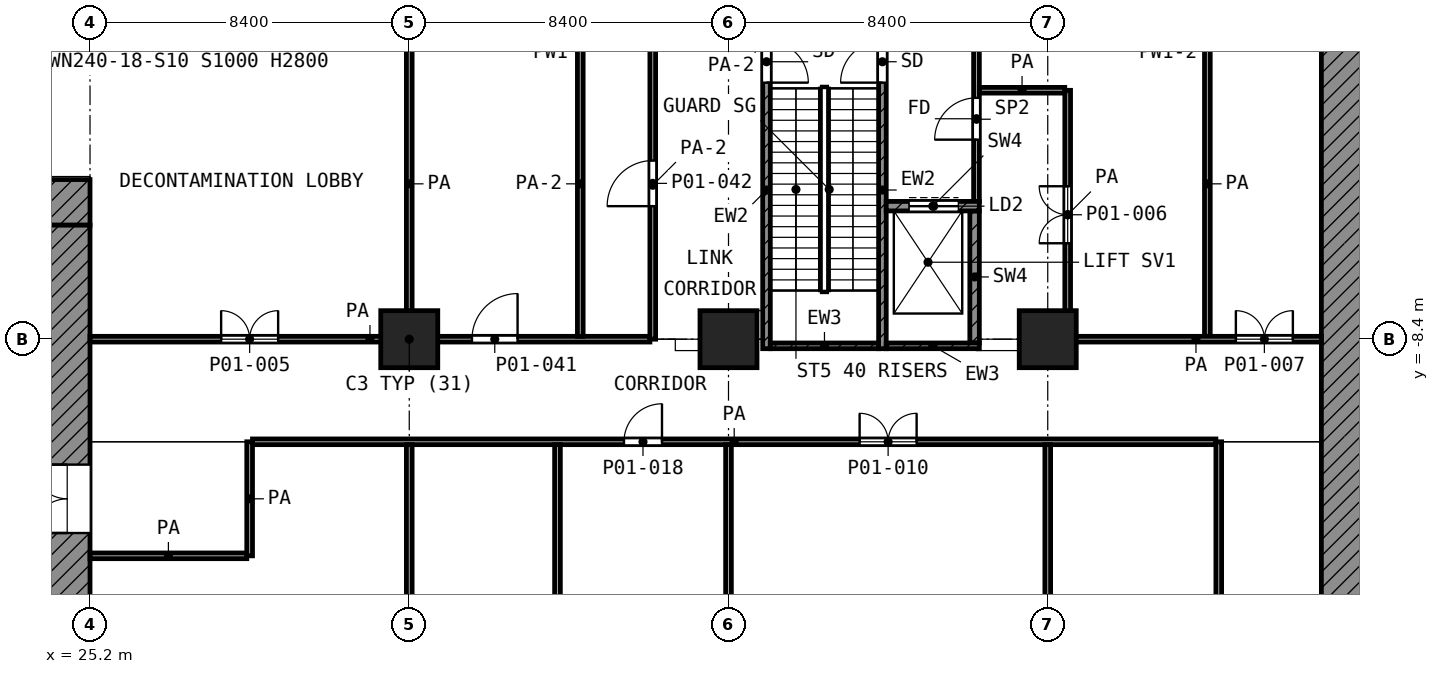
"""IFC4 building model, lengths in metres.
Left out: names, types, materials, properties, quantities, classifications, styles, units other than length and angle.
Written with IfcOpenShell. Run it as: python <this file> out.ifc"""

import sys

from ifc_helpers import new_model, si_unit, direction, frame, frame_2d, origin, origin_2d, place, context, subcontext, project, spatial, polyline, rectangle, outline, extrude, element, fill, save


model = new_model("IFC4")
c1 = context("Model", 3, precision=1e-05, world=origin(), true_north=direction((0.0, 1.0)))
c2 = subcontext(c1, "Body", "Model", "MODEL_VIEW")
j1 = project(units=[si_unit("LENGTHUNIT", "METRE"), si_unit("PLANEANGLEUNIT", "RADIAN")], contexts=[c1])
p1 = place(None, origin())
s1 = spatial("IfcSite", under=j1, at=p1, CompositionType="ELEMENT")
p2 = place(p1, origin())
s2 = spatial("IfcBuilding", under=s1, at=p2, CompositionType="ELEMENT")
p3 = place(p2, origin())
s3 = spatial("IfcBuildingStorey", under=s2, at=p3, CompositionType="ELEMENT", Elevation=0.0)
for number, where, z_axis, x_axis in (
    (1, (33.6, -8.4, 0.0), (0.0, 0.0, 1.0), (1.0, 0.0, 0.0)),
    (2, (42.0, -8.4, 0.0), (0.0, 0.0, 1.0), (1.0, 0.0, 0.0)),
    (3, (50.4, -8.4, 0.0), (0.0, 0.0, 1.0), (1.0, 0.0, 0.0)),
):
    element("IfcColumn", number, at=place(p3, frame(where, z_axis=z_axis, x_axis=x_axis)), inside=s3, PredefinedType="COLUMN", context=c2, shape_type="SweptSolid", body=[
        extrude(rectangle(XDim=1.5, YDim=1.5, at=origin_2d()), origin(), (0.0, 0.0, 1.0), 7.0),
    ])
p4 = place(p3, frame((0.0, 0.0, 0.0), z_axis=(0.0, -1.0, 0.0), x_axis=(1.0, 0.0, 0.0)))
e4 = element("IfcWall", 4, at=p4, inside=s3, PredefinedType="SHEAR", context=c2, shape_type="SweptSolid", body=[
    extrude(outline(polyline([(60.0, 7.0), (60.0, 6.75), (60.0, 4.5), (60.0, 2.25), (60.0, 0.0), (57.6, 0.0), (57.6, 7.0), (60.0, 7.0)])), origin(), (0.0, 0.0, 1.0), 33.6),
])
p5 = place(p3, frame((4.2, -4.8, 0.0), z_axis=(0.0, 0.0, 1.0), x_axis=(1.0, 0.0, 0.0)))
e5 = element("IfcWall", 5, at=p5, inside=s3, PredefinedType="SHEAR", context=c2, shape_type="SweptSolid", body=[
    extrude(rectangle(XDim=21.0, YDim=1.2, at=frame_2d((10.5, 0.0))), origin(), (0.0, 0.0, 1.0), 6.65),
])
p6 = place(p5, frame((1.95, 0.0, 0.0)))
e6 = element("IfcOpeningElement", 6, at=p6, cuts=e5, PredefinedType="OPENING", context=c2, shape_type="SweptSolid", body=[
    extrude(rectangle(XDim=1.1, YDim=2.1, at=frame_2d((0.55, 1.05))), frame((0.0, 0.61, 0.0), z_axis=(0.0, -1.0, 0.0), x_axis=(1.0, 0.0, 0.0)), (0.0, 0.0, 1.0), 1.22),
])
p7 = place(p5, frame((17.95, 0.0, 0.0)))
e7 = element("IfcOpeningElement", 7, at=p7, cuts=e5, PredefinedType="OPENING", context=c2, shape_type="SweptSolid", body=[
    extrude(rectangle(XDim=1.1, YDim=2.1, at=frame_2d((0.55, 1.05))), frame((0.0, 0.61, 0.0), z_axis=(0.0, -1.0, 0.0), x_axis=(1.0, 0.0, 0.0)), (0.0, 0.0, 1.0), 1.22),
])
p8 = place(p3, frame((24.6, -24.0, 0.0), z_axis=(0.0, 0.0, 1.0), x_axis=(0.0, 1.0, 0.0)))
e8 = element("IfcWall", 8, at=p8, inside=s3, PredefinedType="SHEAR", context=c2, shape_type="SweptSolid", body=[
    extrude(rectangle(XDim=18.6, YDim=1.2, at=frame_2d((9.3, 0.0))), origin(), (0.0, 0.0, 1.0), 6.65),
])
p9 = place(p8, frame((10.5, 0.0, 0.0)))
e9 = element("IfcOpeningElement", 9, at=p9, cuts=e8, PredefinedType="OPENING", context=c2, shape_type="SweptSolid", body=[
    extrude(rectangle(XDim=1.8, YDim=2.1, at=frame_2d((0.9, 1.05))), frame((0.0, 0.61, 0.0), z_axis=(0.0, -1.0, 0.0), x_axis=(1.0, 0.0, 0.0)), (0.0, 0.0, 1.0), 1.22),
])
p10 = place(p3, frame((43.0, -8.65, 0.0), z_axis=(0.0, 0.0, 1.0), x_axis=(0.0, 1.0, 0.0)))
e10 = element("IfcWall", 10, at=p10, inside=s3, PredefinedType="SHEAR", context=c2, shape_type="SweptSolid", body=[
    extrude(rectangle(XDim=8.35, YDim=0.2, at=frame_2d((4.175, 0.0))), origin(), (0.0, 0.0, 1.0), 6.65),
])
p11 = place(p10, frame((7.0, 0.0, 0.0)))
e11 = element("IfcOpeningElement", 11, at=p11, cuts=e10, PredefinedType="OPENING", context=c2, shape_type="SweptSolid", body=[
    extrude(rectangle(XDim=1.1, YDim=2.1, at=frame_2d((0.55, 1.05))), frame((0.0, 0.11, 0.0), z_axis=(0.0, -1.0, 0.0), x_axis=(1.0, 0.0, 0.0)), (0.0, 0.0, 1.0), 0.22),
])
p12 = place(p3, frame((46.05, -8.65, 0.0), z_axis=(0.0, 0.0, 1.0), x_axis=(0.0, 1.0, 0.0)))
e12 = element("IfcWall", 12, at=p12, inside=s3, PredefinedType="SHEAR", context=c2, shape_type="SweptSolid", body=[
    extrude(rectangle(XDim=8.35, YDim=0.2, at=frame_2d((4.175, 0.0))), origin(), (0.0, 0.0, 1.0), 6.65),
])
p13 = place(p12, frame((7.0, 0.0, 0.0)))
e13 = element("IfcOpeningElement", 13, at=p13, cuts=e12, PredefinedType="OPENING", context=c2, shape_type="SweptSolid", body=[
    extrude(rectangle(XDim=1.1, YDim=2.1, at=frame_2d((0.55, 1.05))), frame((0.0, 0.11, 0.0), z_axis=(0.0, -1.0, 0.0), x_axis=(1.0, 0.0, 0.0)), (0.0, 0.0, 1.0), 0.22),
])
p14 = place(p3, frame((43.1, -8.575, 0.0), z_axis=(0.0, 0.0, 1.0), x_axis=(1.0, 0.0, 0.0)))
e14 = element("IfcWall", 14, at=p14, inside=s3, PredefinedType="SHEAR", context=c2, shape_type="SweptSolid", body=[
    extrude(rectangle(XDim=2.85, YDim=0.15, at=frame_2d((1.425, 0.0))), origin(), (0.0, 0.0, 1.0), 6.65),
])
p15 = place(p3, frame((46.15, -8.575, 0.0), z_axis=(0.0, 0.0, 1.0), x_axis=(1.0, 0.0, 0.0)))
e15 = element("IfcWall", 15, at=p15, inside=s3, PredefinedType="SHEAR", context=c2, shape_type="SweptSolid", body=[
    extrude(rectangle(XDim=2.45, YDim=0.15, at=frame_2d((1.225, 0.0))), origin(), (0.0, 0.0, 1.0), 6.65),
])
p16 = place(p3, frame((46.15, -4.9, 0.0), z_axis=(0.0, 0.0, 1.0), x_axis=(1.0, 0.0, 0.0)))
e16 = element("IfcWall", 16, at=p16, inside=s3, PredefinedType="SHEAR", context=c2, shape_type="SweptSolid", body=[
    extrude(rectangle(XDim=2.45, YDim=0.25, at=frame_2d((1.225, 0.0))), origin(), (0.0, 0.0, 1.0), 6.65),
])
p17 = place(p16, frame((0.6, 0.0, 0.0)))
e17 = element("IfcOpeningElement", 17, at=p17, cuts=e16, PredefinedType="OPENING", context=c2, shape_type="SweptSolid", body=[
    extrude(rectangle(XDim=1.3, YDim=2.1, at=frame_2d((0.65, 1.05))), frame((0.0, 0.135, 0.0), z_axis=(0.0, -1.0, 0.0), x_axis=(1.0, 0.0, 0.0)), (0.0, 0.0, 1.0), 0.27),
])
p18 = place(p3, frame((48.475, -8.5, 0.0), z_axis=(0.0, 0.0, 1.0), x_axis=(0.0, 1.0, 0.0)))
e18 = element("IfcWall", 18, at=p18, inside=s3, PredefinedType="SHEAR", context=c2, shape_type="SweptSolid", body=[
    extrude(rectangle(XDim=3.475, YDim=0.25, at=frame_2d((1.738, 0.0))), origin(), (0.0, 0.0, 1.0), 6.65),
])
p19 = place(p3, frame((48.525, -4.775, 0.0), z_axis=(0.0, 0.0, 1.0), x_axis=(0.0, 1.0, 0.0)))
e19 = element("IfcWall", 19, at=p19, inside=s3, PredefinedType="PARTITIONING", context=c2, shape_type="SweptSolid", body=[
    extrude(rectangle(XDim=4.325, YDim=0.15, at=frame_2d((2.163, 0.0))), origin(), (0.0, 0.0, 1.0), 6.65),
])
p20 = place(p19, frame((1.625, 0.0, 0.0)))
e20 = element("IfcOpeningElement", 20, at=p20, cuts=e19, PredefinedType="OPENING", context=c2, shape_type="SweptSolid", body=[
    extrude(rectangle(XDim=1.1, YDim=2.1, at=frame_2d((0.55, 1.05))), frame((0.0, 0.085, 0.0), z_axis=(0.0, -1.0, 0.0), x_axis=(1.0, 0.0, 0.0)), (0.0, 0.0, 1.0), 0.17),
])
p21 = place(p3, frame((25.2, -14.1, 0.0), z_axis=(0.0, 0.0, 1.0), x_axis=(1.0, 0.0, 0.0)))
e21 = element("IfcWall", 21, at=p21, inside=s3, PredefinedType="PARTITIONING", context=c2, shape_type="SweptSolid", body=[
    extrude(rectangle(XDim=4.125, YDim=0.15, at=frame_2d((2.062, 0.0))), origin(), (0.0, 0.0, 1.0), 6.65),
])
p22 = place(p3, frame((29.475, -11.1, 0.0), z_axis=(0.0, 0.0, 1.0), x_axis=(1.0, 0.0, 0.0)))
e22 = element("IfcWall", 22, at=p22, inside=s3, PredefinedType="PARTITIONING", context=c2, shape_type="SweptSolid", body=[
    extrude(rectangle(XDim=25.35, YDim=0.15, at=frame_2d((12.675, 0.0))), origin(), (0.0, 0.0, 1.0), 6.65),
])
p23 = place(p22, frame((9.775, 0.0, 0.0)))
e23 = element("IfcOpeningElement", 23, at=p23, cuts=e22, PredefinedType="OPENING", context=c2, shape_type="SweptSolid", body=[
    extrude(rectangle(XDim=1.0, YDim=2.1, at=frame_2d((0.5, 1.05))), frame((0.0, 0.085, 0.0), z_axis=(0.0, -1.0, 0.0), x_axis=(1.0, 0.0, 0.0)), (0.0, 0.0, 1.0), 0.17),
])
p24 = place(p22, frame((15.975, 0.0, 0.0)))
e24 = element("IfcOpeningElement", 24, at=p24, cuts=e22, PredefinedType="OPENING", context=c2, shape_type="SweptSolid", body=[
    extrude(rectangle(XDim=1.5, YDim=2.1, at=frame_2d((0.75, 1.05))), frame((0.0, 0.085, 0.0), z_axis=(0.0, -1.0, 0.0), x_axis=(1.0, 0.0, 0.0)), (0.0, 0.0, 1.0), 0.17),
])
p25 = place(p3, frame((25.2, -8.4, 0.0), z_axis=(0.0, 0.0, 1.0), x_axis=(1.0, 0.0, 0.0)))
e25 = element("IfcWall", 25, at=p25, inside=s3, PredefinedType="PARTITIONING", context=c2, shape_type="SweptSolid", body=[
    extrude(rectangle(XDim=14.732, YDim=0.15, at=frame_2d((7.366, 0.0))), origin(), (0.0, 0.0, 1.0), 6.65),
])
p26 = place(p25, frame((3.45, 0.0, 0.0)))
e26 = element("IfcOpeningElement", 26, at=p26, cuts=e25, PredefinedType="OPENING", context=c2, shape_type="SweptSolid", body=[
    extrude(rectangle(XDim=1.5, YDim=2.1, at=frame_2d((0.75, 1.05))), frame((0.0, 0.085, 0.0), z_axis=(0.0, -1.0, 0.0), x_axis=(1.0, 0.0, 0.0)), (0.0, 0.0, 1.0), 0.17),
])
p27 = place(p25, frame((10.05, 0.0, 0.0)))
e27 = element("IfcOpeningElement", 27, at=p27, cuts=e25, PredefinedType="OPENING", context=c2, shape_type="SweptSolid", body=[
    extrude(rectangle(XDim=1.2, YDim=2.1, at=frame_2d((0.6, 1.05))), frame((0.0, 0.085, 0.0), z_axis=(0.0, -1.0, 0.0), x_axis=(1.0, 0.0, 0.0)), (0.0, 0.0, 1.0), 0.17),
])
p28 = place(p3, frame((51.0, -8.4, 0.0), z_axis=(0.0, 0.0, 1.0), x_axis=(1.0, 0.0, 0.0)))
e28 = element("IfcWall", 28, at=p28, inside=s3, PredefinedType="PARTITIONING", context=c2, shape_type="SweptSolid", body=[
    extrude(rectangle(XDim=6.6, YDim=0.15, at=frame_2d((3.3, 0.0))), origin(), (0.0, 0.0, 1.0), 6.65),
])
p29 = place(p28, frame((4.35, 0.0, 0.0)))
e29 = element("IfcOpeningElement", 29, at=p29, cuts=e28, PredefinedType="OPENING", context=c2, shape_type="SweptSolid", body=[
    extrude(rectangle(XDim=1.5, YDim=2.1, at=frame_2d((0.75, 1.05))), frame((0.0, 0.085, 0.0), z_axis=(0.0, -1.0, 0.0), x_axis=(1.0, 0.0, 0.0)), (0.0, 0.0, 1.0), 0.17),
])
p30 = place(p3, frame((48.6, -1.85, 0.0), z_axis=(0.0, 0.0, 1.0), x_axis=(1.0, 0.0, 0.0)))
e30 = element("IfcWall", 30, at=p30, inside=s3, PredefinedType="PARTITIONING", context=c2, shape_type="SweptSolid", body=[
    extrude(rectangle(XDim=2.248, YDim=0.15, at=frame_2d((1.124, 0.0))), origin(), (0.0, 0.0, 1.0), 6.65),
])
p31 = place(p3, frame((29.4, -14.1, 0.0), z_axis=(0.0, 0.0, 1.0), x_axis=(0.0, 1.0, 0.0)))
e31 = element("IfcWall", 31, at=p31, inside=s3, PredefinedType="PARTITIONING", context=c2, shape_type="SweptSolid", body=[
    extrude(rectangle(XDim=3.0, YDim=0.15, at=frame_2d((1.5, 0.0))), origin(), (0.0, 0.0, 1.0), 6.65),
])
p32 = place(p3, frame((33.6, -22.425, 0.0), z_axis=(0.0, 0.0, 1.0), x_axis=(0.0, 1.0, 0.0)))
e32 = element("IfcWall", 32, at=p32, inside=s3, PredefinedType="PARTITIONING", context=c2, shape_type="SweptSolid", body=[
    extrude(rectangle(XDim=11.25, YDim=0.15, at=frame_2d((5.625, 0.0))), origin(), (0.0, 0.0, 1.0), 6.65),
])
p33 = place(p3, frame((33.6, -8.325, 0.0), z_axis=(0.0, 0.0, 1.0), x_axis=(0.0, 1.0, 0.0)))
e33 = element("IfcWall", 33, at=p33, inside=s3, PredefinedType="PARTITIONING", context=c2, shape_type="SweptSolid", body=[
    extrude(rectangle(XDim=8.025, YDim=0.15, at=frame_2d((4.012, 0.0))), origin(), (0.0, 0.0, 1.0), 6.65),
])
p34 = place(p3, frame((37.5, -22.425, 0.0), z_axis=(0.0, 0.0, 1.0), x_axis=(0.0, 1.0, 0.0)))
e34 = element("IfcWall", 34, at=p34, inside=s3, PredefinedType="PARTITIONING", context=c2, shape_type="SweptSolid", body=[
    extrude(rectangle(XDim=11.25, YDim=0.15, at=frame_2d((5.625, 0.0))), origin(), (0.0, 0.0, 1.0), 6.65),
])
p35 = place(p3, frame((38.1, -8.325, 0.0), z_axis=(0.0, 0.0, 1.0), x_axis=(0.0, 1.0, 0.0)))
e35 = element("IfcWall", 35, at=p35, inside=s3, PredefinedType="PARTITIONING", context=c2, shape_type="SweptSolid", body=[
    extrude(rectangle(XDim=8.025, YDim=0.15, at=frame_2d((4.012, 0.0))), origin(), (0.0, 0.0, 1.0), 5.25),
])
p36 = place(p3, frame((40.007, -8.4, 0.0), z_axis=(0.0, 0.0, 1.0), x_axis=(0.0, 1.0, 0.0)))
e36 = element("IfcWall", 36, at=p36, inside=s3, PredefinedType="PARTITIONING", context=c2, shape_type="SweptSolid", body=[
    extrude(rectangle(XDim=8.1, YDim=0.15, at=frame_2d((4.05, 0.0))), origin(), (0.0, 0.0, 1.0), 5.25),
])
p37 = place(p36, frame((3.5, 0.0, 0.0)))
e37 = element("IfcOpeningElement", 37, at=p37, cuts=e36, PredefinedType="OPENING", context=c2, shape_type="SweptSolid", body=[
    extrude(rectangle(XDim=1.2, YDim=2.1, at=frame_2d((0.6, 1.05))), frame((0.0, 0.085, 0.0), z_axis=(0.0, -1.0, 0.0), x_axis=(1.0, 0.0, 0.0)), (0.0, 0.0, 1.0), 0.17),
])
for number, where, z_axis, x_axis in (
    (38, (42.0, -22.425, 0.0), (0.0, 0.0, 1.0), (0.0, 1.0, 0.0)),
    (39, (50.4, -22.425, 0.0), (0.0, 0.0, 1.0), (0.0, 1.0, 0.0)),
):
    element("IfcWall", number, at=place(p3, frame(where, z_axis=z_axis, x_axis=x_axis)), inside=s3, PredefinedType="PARTITIONING", context=c2, shape_type="SweptSolid", body=[
        extrude(rectangle(XDim=11.25, YDim=0.15, at=frame_2d((5.625, 0.0))), origin(), (0.0, 0.0, 1.0), 6.65),
    ])
p38 = place(p3, frame((50.925, -8.4, 0.0), z_axis=(0.0, 0.0, 1.0), x_axis=(0.0, 1.0, 0.0)))
e40 = element("IfcWall", 40, at=p38, inside=s3, PredefinedType="PARTITIONING", context=c2, shape_type="SweptSolid", body=[
    extrude(rectangle(XDim=6.548, YDim=0.15, at=frame_2d((3.274, 0.0))), origin(), (0.0, 0.0, 1.0), 6.65),
])
p39 = place(p38, frame((2.524, 0.0, 0.0)))
e41 = element("IfcOpeningElement", 41, at=p39, cuts=e40, PredefinedType="OPENING", context=c2, shape_type="SweptSolid", body=[
    extrude(rectangle(XDim=1.5, YDim=2.1, at=frame_2d((0.75, 1.05))), frame((0.0, 0.085, 0.0), z_axis=(0.0, -1.0, 0.0), x_axis=(1.0, 0.0, 0.0)), (0.0, 0.0, 1.0), 0.17),
])
p40 = place(p3, frame((54.6, -8.325, 0.0), z_axis=(0.0, 0.0, 1.0), x_axis=(0.0, 1.0, 0.0)))
e42 = element("IfcWall", 42, at=p40, inside=s3, PredefinedType="PARTITIONING", context=c2, shape_type="SweptSolid", body=[
    extrude(rectangle(XDim=8.025, YDim=0.15, at=frame_2d((4.012, 0.0))), origin(), (0.0, 0.0, 1.0), 6.65),
])
p41 = place(p3, frame((54.9, -22.5, 0.0), z_axis=(0.0, 0.0, 1.0), x_axis=(0.0, 1.0, 0.0)))
e43 = element("IfcWall", 43, at=p41, inside=s3, PredefinedType="PARTITIONING", context=c2, shape_type="SweptSolid", body=[
    extrude(rectangle(XDim=11.4, YDim=0.15, at=frame_2d((5.7, 0.0))), origin(), (0.0, 0.0, 1.0), 6.65),
])
p42 = place(p41, frame((4.95, 0.0, 0.0)))
e44 = element("IfcOpeningElement", 44, at=p42, cuts=e43, PredefinedType="OPENING", context=c2, shape_type="SweptSolid", body=[
    extrude(rectangle(XDim=1.5, YDim=2.1, at=frame_2d((0.75, 1.05))), frame((0.0, 0.085, 0.0), z_axis=(0.0, -1.0, 0.0), x_axis=(1.0, 0.0, 0.0)), (0.0, 0.0, 1.0), 0.17),
])
p43 = place(p9, origin())
e45 = element("IfcDoor", 45, at=p43, inside=s3, OperationType="DOUBLE_DOOR_SINGLE_SWING", PredefinedType="DOOR", context=c2, shape_type="SweptSolid", body=[
    extrude(rectangle(XDim=1.8, YDim=2.1, at=frame_2d((0.9, 1.05))), frame((0.0, 0.025, 0.0), z_axis=(0.0, -1.0, 0.0), x_axis=(1.0, 0.0, 0.0)), (0.0, 0.0, 1.0), 0.05),
])
fill(e9, e45)
p44 = place(p11, frame((1.1, 0.0, 0.0), z_axis=(0.0, 0.0, 1.0), x_axis=(-1.0, 0.0, 0.0)))
e46 = element("IfcDoor", 46, at=p44, inside=s3, OperationType="SINGLE_SWING_LEFT", PredefinedType="DOOR", context=c2, shape_type="SweptSolid", body=[
    extrude(rectangle(XDim=1.1, YDim=2.1, at=frame_2d((0.55, 1.05))), frame((0.0, 0.025, 0.0), z_axis=(0.0, -1.0, 0.0), x_axis=(1.0, 0.0, 0.0)), (0.0, 0.0, 1.0), 0.05),
])
fill(e11, e46)
p45 = place(p13, origin())
e47 = element("IfcDoor", 47, at=p45, inside=s3, OperationType="SINGLE_SWING_LEFT", PredefinedType="DOOR", context=c2, shape_type="SweptSolid", body=[
    extrude(rectangle(XDim=1.1, YDim=2.1, at=frame_2d((0.55, 1.05))), frame((0.0, 0.025, 0.0), z_axis=(0.0, -1.0, 0.0), x_axis=(1.0, 0.0, 0.0)), (0.0, 0.0, 1.0), 0.05),
])
fill(e13, e47)
p46 = place(p17, origin())
e48 = element("IfcDoor", 48, at=p46, inside=s3, OperationType="DOUBLE_DOOR_SLIDING", PredefinedType="DOOR", context=c2, shape_type="SweptSolid", body=[
    extrude(rectangle(XDim=1.3, YDim=2.1, at=frame_2d((0.65, 1.05))), frame((0.0, 0.025, 0.0), z_axis=(0.0, -1.0, 0.0), x_axis=(1.0, 0.0, 0.0)), (0.0, 0.0, 1.0), 0.05),
])
fill(e17, e48)
p47 = place(p20, origin())
e49 = element("IfcDoor", 49, at=p47, inside=s3, OperationType="SINGLE_SWING_LEFT", PredefinedType="DOOR", context=c2, shape_type="SweptSolid", body=[
    extrude(rectangle(XDim=1.1, YDim=2.1, at=frame_2d((0.55, 1.05))), frame((0.0, 0.025, 0.0), z_axis=(0.0, -1.0, 0.0), x_axis=(1.0, 0.0, 0.0)), (0.0, 0.0, 1.0), 0.05),
])
fill(e20, e49)
p48 = place(p26, origin())
e50 = element("IfcDoor", 50, at=p48, inside=s3, OperationType="DOUBLE_DOOR_SINGLE_SWING", PredefinedType="DOOR", context=c2, shape_type="SweptSolid", body=[
    extrude(rectangle(XDim=1.5, YDim=2.1, at=frame_2d((0.75, 1.05))), frame((0.0, 0.025, 0.0), z_axis=(0.0, -1.0, 0.0), x_axis=(1.0, 0.0, 0.0)), (0.0, 0.0, 1.0), 0.05),
])
fill(e26, e50)
p49 = place(p27, origin())
e51 = element("IfcDoor", 51, at=p49, inside=s3, OperationType="SINGLE_SWING_RIGHT", PredefinedType="DOOR", context=c2, shape_type="SweptSolid", body=[
    extrude(rectangle(XDim=1.2, YDim=2.1, at=frame_2d((0.6, 1.05))), frame((0.0, 0.025, 0.0), z_axis=(0.0, -1.0, 0.0), x_axis=(1.0, 0.0, 0.0)), (0.0, 0.0, 1.0), 0.05),
])
fill(e27, e51)
p50 = place(p37, origin())
e52 = element("IfcDoor", 52, at=p50, inside=s3, OperationType="SINGLE_SWING_LEFT", PredefinedType="DOOR", context=c2, shape_type="SweptSolid", body=[
    extrude(rectangle(XDim=1.2, YDim=2.1, at=frame_2d((0.6, 1.05))), frame((0.0, 0.025, 0.0), z_axis=(0.0, -1.0, 0.0), x_axis=(1.0, 0.0, 0.0)), (0.0, 0.0, 1.0), 0.05),
])
fill(e37, e52)
p51 = place(p39, origin())
e53 = element("IfcDoor", 53, at=p51, inside=s3, OperationType="DOUBLE_DOOR_SINGLE_SWING", PredefinedType="DOOR", context=c2, shape_type="SweptSolid", body=[
    extrude(rectangle(XDim=1.5, YDim=2.1, at=frame_2d((0.75, 1.05))), frame((0.0, 0.025, 0.0), z_axis=(0.0, -1.0, 0.0), x_axis=(1.0, 0.0, 0.0)), (0.0, 0.0, 1.0), 0.05),
])
fill(e41, e53)
p52 = place(p29, origin())
e54 = element("IfcDoor", 54, at=p52, inside=s3, OperationType="DOUBLE_DOOR_SINGLE_SWING", PredefinedType="DOOR", context=c2, shape_type="SweptSolid", body=[
    extrude(rectangle(XDim=1.5, YDim=2.1, at=frame_2d((0.75, 1.05))), frame((0.0, 0.025, 0.0), z_axis=(0.0, -1.0, 0.0), x_axis=(1.0, 0.0, 0.0)), (0.0, 0.0, 1.0), 0.05),
])
fill(e29, e54)
p53 = place(p23, origin())
e55 = element("IfcDoor", 55, at=p53, inside=s3, OperationType="SINGLE_SWING_RIGHT", PredefinedType="DOOR", context=c2, shape_type="SweptSolid", body=[
    extrude(rectangle(XDim=1.0, YDim=2.1, at=frame_2d((0.5, 1.05))), frame((0.0, 0.025, 0.0), z_axis=(0.0, -1.0, 0.0), x_axis=(1.0, 0.0, 0.0)), (0.0, 0.0, 1.0), 0.05),
])
fill(e23, e55)
p54 = place(p24, origin())
e56 = element("IfcDoor", 56, at=p54, inside=s3, OperationType="DOUBLE_DOOR_SINGLE_SWING", PredefinedType="DOOR", context=c2, shape_type="SweptSolid", body=[
    extrude(rectangle(XDim=1.5, YDim=2.1, at=frame_2d((0.75, 1.05))), frame((0.0, 0.025, 0.0), z_axis=(0.0, -1.0, 0.0), x_axis=(1.0, 0.0, 0.0)), (0.0, 0.0, 1.0), 0.05),
])
fill(e24, e56)
save(model, sys.argv[1])
